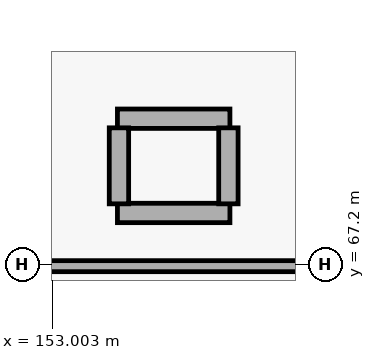
"""IFC4 building model, lengths in metres.
Left out: names, types, materials, properties, quantities, classifications, styles, units other than length and angle.
Written with IfcOpenShell. Run it as: python <this file> out.ifc"""

import sys

from ifc_helpers import new_model, si_unit, direction, frame, frame_2d, origin, place, context, subcontext, project, spatial, rectangle, extrude, element, save


model = new_model("IFC4")
c1 = context("Model", 3, precision=1e-05, world=origin(), true_north=direction((0.0, 1.0)))
c2 = subcontext(c1, "Body", "Model", "MODEL_VIEW")
j1 = project(units=[si_unit("LENGTHUNIT", "METRE"), si_unit("PLANEANGLEUNIT", "RADIAN")], contexts=[c1])
p1 = place(None, origin())
s1 = spatial("IfcSite", under=j1, at=p1, CompositionType="ELEMENT")
p2 = place(p1, origin())
s2 = spatial("IfcBuilding", under=s1, at=p2, CompositionType="ELEMENT")
p3 = place(p2, frame((0.0, 0.0, -4.8)))
s3 = spatial("IfcBuildingStorey", under=s2, at=p3, CompositionType="ELEMENT", Elevation=-4.8)
for number, where, z_axis, x_axis in (
    (1, (153.86, 69.12, 0.0), (0.0, 0.0, 1.0), (1.0, 0.0, 0.0)),
    (2, (153.86, 67.88, 0.0), (0.0, 0.0, 1.0), (1.0, 0.0, 0.0)),
):
    element("IfcWall", number, at=place(p3, frame(where, z_axis=z_axis, x_axis=x_axis)), inside=s3, PredefinedType="PARTITIONING", context=c2, shape_type="SweptSolid", body=[
        extrude(rectangle(XDim=1.48, YDim=0.255, at=frame_2d((0.74, 0.0))), origin(), (0.0, 0.0, 1.0), 4.09),
    ])
p4 = place(p3, frame((153.88, 68.0, 0.0), z_axis=(0.0, 0.0, 1.0), x_axis=(0.0, 1.0, 0.0)))
e3 = element("IfcWall", 3, at=p4, inside=s3, PredefinedType="PARTITIONING", context=c2, shape_type="SweptSolid", body=[
    extrude(rectangle(XDim=1.0, YDim=0.255, at=frame_2d((0.5, 0.0))), origin(), (0.0, 0.0, 1.0), 4.36),
])
p5 = place(p3, frame((155.32, 68.0, 0.0), z_axis=(0.0, 0.0, 1.0), x_axis=(0.0, 1.0, 0.0)))
e4 = element("IfcWall", 4, at=p5, inside=s3, PredefinedType="PARTITIONING", context=c2, shape_type="SweptSolid", body=[
    extrude(rectangle(XDim=1.0, YDim=0.255, at=frame_2d((0.5, 0.0))), origin(), (0.0, 0.0, 1.0), 4.09),
])
p6 = place(p3, frame((142.43, 67.18, 0.0), z_axis=(0.0, 0.0, 1.0), x_axis=(1.0, 0.0, 0.0)))
e5 = element("IfcWall", 5, at=p6, inside=s3, PredefinedType="PARTITIONING", context=c2, shape_type="SweptSolid", body=[
    extrude(rectangle(XDim=23.14, YDim=0.145, at=frame_2d((11.57, 0.0))), origin(), (0.0, 0.0, 1.0), 3.41),
])
p7 = place(p6, frame((18.9, 0.0, 0.0)))
e6 = element("IfcOpeningElement", 6, at=p7, cuts=e5, PredefinedType="OPENING", context=c2, shape_type="SweptSolid", body=[
    extrude(rectangle(XDim=2.58, YDim=2.82, at=frame_2d((1.29, 1.41))), frame((0.0, 0.083, 0.0), z_axis=(0.0, -1.0, 0.0), x_axis=(1.0, 0.0, 0.0)), (0.0, 0.0, 1.0), 0.165),
])
save(model, sys.argv[1])
